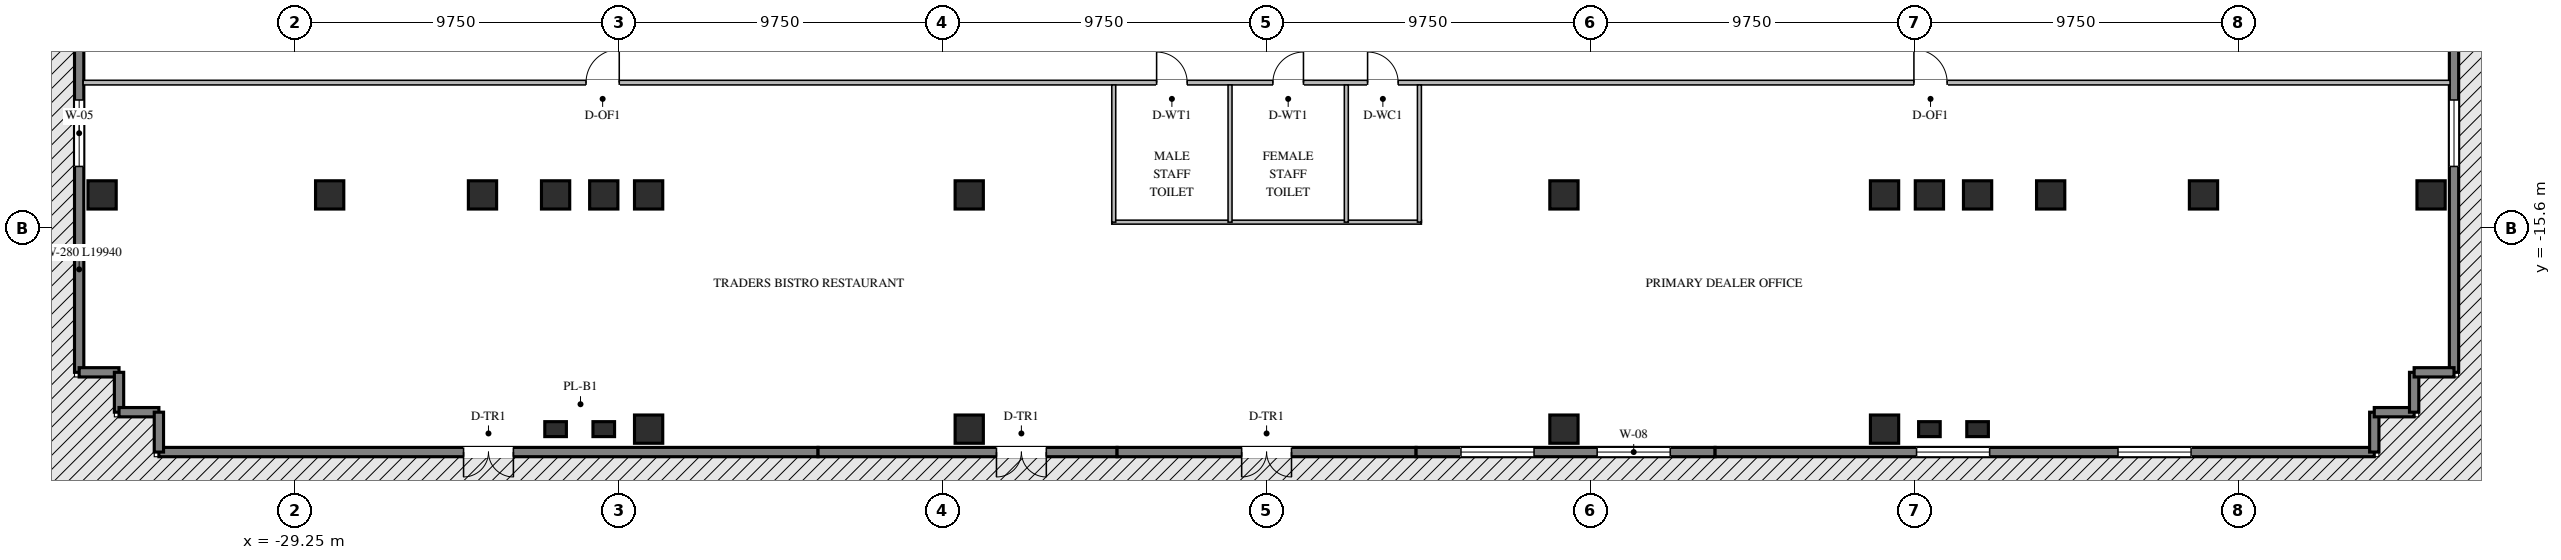
"""IFC4 building model, lengths in metres.
Left out: names, types, materials, properties, quantities, classifications, styles, units other than length and angle.
Written with IfcOpenShell. Run it as: python <this file> out.ifc"""

import sys

from ifc_helpers import new_model, si_unit, direction, frame, frame_2d, origin, origin_2d, place, context, subcontext, project, spatial, rectangle, i_section, extrude, element, fill, save


model = new_model("IFC4")
c1 = context("Model", 3, precision=1e-05, world=origin(), true_north=direction((0.0, 1.0)))
c2 = subcontext(c1, "Body", "Model", "MODEL_VIEW")
j1 = project(units=[si_unit("LENGTHUNIT", "METRE"), si_unit("PLANEANGLEUNIT", "RADIAN")], contexts=[c1])
p1 = place(None, origin())
s1 = spatial("IfcSite", under=j1, at=p1, CompositionType="ELEMENT")
p2 = place(p1, origin())
s2 = spatial("IfcBuilding", under=s1, at=p2, CompositionType="ELEMENT")
p3 = place(p2, frame((0.0, 0.0, 27.0)))
s3 = spatial("IfcBuildingStorey", under=s2, at=p3, CompositionType="ELEMENT", Elevation=27.0)
for number, where, z_axis, x_axis in (
    (1, (-21.4, -14.6, 0.0), (0.0, 0.0, 1.0), (1.0, 0.0, 0.0)),
    (2, (-19.95, -14.6, 0.0), (0.0, 0.0, 1.0), (1.0, 0.0, 0.0)),
    (3, (-18.6, -14.6, 0.0), (0.0, 0.0, 1.0), (1.0, 0.0, 0.0)),
    (4, (-8.95, -14.6, 0.0), (0.0, 0.0, 1.0), (1.0, 0.0, 0.0)),
    (5, (8.95, -14.6, 0.0), (0.0, 0.0, 1.0), (1.0, 0.0, 0.0)),
    (6, (18.6, -14.6, 0.0), (0.0, 0.0, 1.0), (1.0, 0.0, 0.0)),
    (7, (19.95, -14.6, 0.0), (0.0, 0.0, 1.0), (1.0, 0.0, 0.0)),
    (8, (21.4, -14.6, 0.0), (0.0, 0.0, 1.0), (1.0, 0.0, 0.0)),
    (9, (-23.6, -14.6, 0.0), (0.0, 0.0, 1.0), (1.0, 0.0, 0.0)),
    (10, (23.6, -14.6, 0.0), (0.0, 0.0, 1.0), (1.0, 0.0, 0.0)),
    (11, (-28.2, -14.6, 0.0), (0.0, 0.0, 1.0), (1.0, 0.0, 0.0)),
    (12, (28.2, -14.6, 0.0), (0.0, 0.0, 1.0), (1.0, 0.0, 0.0)),
    (13, (-18.6, -21.65, 0.0), (0.0, 0.0, 1.0), (1.0, 0.0, 0.0)),
    (14, (-8.95, -21.65, 0.0), (0.0, 0.0, 1.0), (1.0, 0.0, 0.0)),
    (15, (8.95, -21.65, 0.0), (0.0, 0.0, 1.0), (1.0, 0.0, 0.0)),
    (16, (18.6, -21.65, 0.0), (0.0, 0.0, 1.0), (1.0, 0.0, 0.0)),
    (17, (-35.05, -14.6, 0.0), (0.0, 0.0, 1.0), (1.0, 0.0, 0.0)),
    (18, (35.05, -14.6, 0.0), (0.0, 0.0, 1.0), (1.0, 0.0, 0.0)),
):
    element("IfcColumn", number, at=place(p3, frame(where, z_axis=z_axis, x_axis=x_axis)), inside=s3, PredefinedType="COLUMN", context=c2, shape_type="SweptSolid", body=[
        extrude(i_section(OverallWidth=0.85, OverallDepth=0.85, WebThickness=0.032, FlangeThickness=0.048, at=origin_2d()), origin(), (0.0, 0.0, 1.0), 4.2),
    ])
for number, where, z_axis, x_axis in (
    (19, (-21.4, -21.65, -0.28), (0.0, 0.0, 1.0), (1.0, 0.0, 0.0)),
    (20, (-19.95, -21.65, -0.28), (0.0, 0.0, 1.0), (1.0, 0.0, 0.0)),
    (21, (19.95, -21.65, -0.28), (0.0, 0.0, 1.0), (1.0, 0.0, 0.0)),
    (22, (21.4, -21.65, -0.28), (0.0, 0.0, 1.0), (1.0, 0.0, 0.0)),
):
    element("IfcColumn", number, at=place(p3, frame(where, z_axis=z_axis, x_axis=x_axis)), inside=s3, PredefinedType="PILASTER", context=c2, shape_type="SweptSolid", body=[
        extrude(rectangle(XDim=0.65, YDim=0.45, at=origin_2d()), origin(), (0.0, 0.0, 1.0), 4.48),
    ])
p4 = place(p3, frame((-13.5, -22.34, 0.0), z_axis=(0.0, 0.0, 1.0), x_axis=(-1.0, 0.0, 0.0)))
e23 = element("IfcWall", 23, at=p4, inside=s3, PredefinedType="STANDARD", context=c2, shape_type="SweptSolid", body=[
    extrude(rectangle(XDim=19.84, YDim=0.28, at=frame_2d((9.92, 0.0))), origin(), (0.0, 0.0, 1.0), 4.0),
])
p5 = place(p4, frame((9.17, 0.0, 0.0)))
e24 = element("IfcOpeningElement", 24, at=p5, cuts=e23, PredefinedType="OPENING", context=c2, shape_type="SweptSolid", body=[
    extrude(rectangle(XDim=1.5, YDim=2.15, at=frame_2d((0.75, 1.075))), frame((0.0, 0.15, 0.0), z_axis=(0.0, -1.0, 0.0), x_axis=(1.0, 0.0, 0.0)), (0.0, 0.0, 1.0), 0.3),
])
p6 = place(p3, frame((-4.5, -22.34, 0.0), z_axis=(0.0, 0.0, 1.0), x_axis=(-1.0, 0.0, 0.0)))
e25 = element("IfcWall", 25, at=p6, inside=s3, PredefinedType="STANDARD", context=c2, shape_type="SweptSolid", body=[
    extrude(rectangle(XDim=9.0, YDim=0.28, at=frame_2d((4.5, 0.0))), origin(), (0.0, 0.0, 1.0), 4.0),
])
p7 = place(p6, frame((2.13, 0.0, 0.0)))
e26 = element("IfcOpeningElement", 26, at=p7, cuts=e25, PredefinedType="OPENING", context=c2, shape_type="SweptSolid", body=[
    extrude(rectangle(XDim=1.5, YDim=2.15, at=frame_2d((0.75, 1.075))), frame((0.0, 0.15, 0.0), z_axis=(0.0, -1.0, 0.0), x_axis=(1.0, 0.0, 0.0)), (0.0, 0.0, 1.0), 0.3),
])
p8 = place(p3, frame((4.5, -22.34, 0.0), z_axis=(0.0, 0.0, 1.0), x_axis=(-1.0, 0.0, 0.0)))
e27 = element("IfcWall", 27, at=p8, inside=s3, PredefinedType="STANDARD", context=c2, shape_type="SweptSolid", body=[
    extrude(rectangle(XDim=9.0, YDim=0.28, at=frame_2d((4.5, 0.0))), origin(), (0.0, 0.0, 1.0), 4.0),
])
p9 = place(p8, frame((3.75, 0.0, 0.0)))
e28 = element("IfcOpeningElement", 28, at=p9, cuts=e27, PredefinedType="OPENING", context=c2, shape_type="SweptSolid", body=[
    extrude(rectangle(XDim=1.5, YDim=2.15, at=frame_2d((0.75, 1.075))), frame((0.0, 0.15, 0.0), z_axis=(0.0, -1.0, 0.0), x_axis=(1.0, 0.0, 0.0)), (0.0, 0.0, 1.0), 0.3),
])
p10 = place(p3, frame((13.5, -22.34, 0.0), z_axis=(0.0, 0.0, 1.0), x_axis=(-1.0, 0.0, 0.0)))
e29 = element("IfcWall", 29, at=p10, inside=s3, PredefinedType="STANDARD", context=c2, shape_type="SweptSolid", body=[
    extrude(rectangle(XDim=9.0, YDim=0.28, at=frame_2d((4.5, 0.0))), origin(), (0.0, 0.0, 1.0), 4.0),
])
p11 = place(p10, frame((1.35, 0.0, 0.76)))
e30 = element("IfcOpeningElement", 30, at=p11, cuts=e29, PredefinedType="OPENING", context=c2, shape_type="SweptSolid", body=[
    extrude(rectangle(XDim=2.2, YDim=2.25, at=frame_2d((1.1, 1.125))), frame((0.0, 0.15, 0.0), z_axis=(0.0, -1.0, 0.0), x_axis=(1.0, 0.0, 0.0)), (0.0, 0.0, 1.0), 0.3),
])
p12 = place(p10, frame((5.45, 0.0, 0.76)))
e31 = element("IfcOpeningElement", 31, at=p12, cuts=e29, PredefinedType="OPENING", context=c2, shape_type="SweptSolid", body=[
    extrude(rectangle(XDim=2.2, YDim=2.25, at=frame_2d((1.1, 1.125))), frame((0.0, 0.15, 0.0), z_axis=(0.0, -1.0, 0.0), x_axis=(1.0, 0.0, 0.0)), (0.0, 0.0, 1.0), 0.3),
])
p13 = place(p3, frame((33.34, -22.34, 0.0), z_axis=(0.0, 0.0, 1.0), x_axis=(-1.0, 0.0, 0.0)))
e32 = element("IfcWall", 32, at=p13, inside=s3, PredefinedType="STANDARD", context=c2, shape_type="SweptSolid", body=[
    extrude(rectangle(XDim=19.84, YDim=0.28, at=frame_2d((9.92, 0.0))), origin(), (0.0, 0.0, 1.0), 4.0),
])
p14 = place(p13, frame((5.513, 0.0, 0.76)))
e33 = element("IfcOpeningElement", 33, at=p14, cuts=e32, PredefinedType="OPENING", context=c2, shape_type="SweptSolid", body=[
    extrude(rectangle(XDim=2.2, YDim=2.25, at=frame_2d((1.1, 1.125))), frame((0.0, 0.15, 0.0), z_axis=(0.0, -1.0, 0.0), x_axis=(1.0, 0.0, 0.0)), (0.0, 0.0, 1.0), 0.3),
])
p15 = place(p13, frame((11.577, 0.0, 0.76)))
e34 = element("IfcOpeningElement", 34, at=p15, cuts=e32, PredefinedType="OPENING", context=c2, shape_type="SweptSolid", body=[
    extrude(rectangle(XDim=2.2, YDim=2.25, at=frame_2d((1.1, 1.125))), frame((0.0, 0.15, 0.0), z_axis=(0.0, -1.0, 0.0), x_axis=(1.0, 0.0, 0.0)), (0.0, 0.0, 1.0), 0.3),
])
p16 = place(p3, frame((-35.74, -19.94, 0.0), z_axis=(0.0, 0.0, 1.0), x_axis=(0.0, 1.0, 0.0)))
e35 = element("IfcWall", 35, at=p16, inside=s3, PredefinedType="STANDARD", context=c2, shape_type="SweptSolid", body=[
    extrude(rectangle(XDim=19.94, YDim=0.28, at=frame_2d((9.97, 0.0))), origin(), (0.0, 0.0, 1.0), 4.0),
])
p17 = place(p16, frame((6.197, 0.0, 0.76)))
e36 = element("IfcOpeningElement", 36, at=p17, cuts=e35, PredefinedType="OPENING", context=c2, shape_type="SweptSolid", body=[
    extrude(rectangle(XDim=2.0, YDim=2.05, at=frame_2d((1.0, 1.025))), frame((0.0, 0.15, 0.0), z_axis=(0.0, -1.0, 0.0), x_axis=(1.0, 0.0, 0.0)), (0.0, 0.0, 1.0), 0.3),
])
p18 = place(p16, frame((12.293, 0.0, 0.76)))
e37 = element("IfcOpeningElement", 37, at=p18, cuts=e35, PredefinedType="OPENING", context=c2, shape_type="SweptSolid", body=[
    extrude(rectangle(XDim=2.0, YDim=2.05, at=frame_2d((1.0, 1.025))), frame((0.0, 0.15, 0.0), z_axis=(0.0, -1.0, 0.0), x_axis=(1.0, 0.0, 0.0)), (0.0, 0.0, 1.0), 0.3),
])
p19 = place(p3, frame((35.74, 0.0, 0.0), z_axis=(0.0, 0.0, 1.0), x_axis=(0.0, -1.0, 0.0)))
e38 = element("IfcWall", 38, at=p19, inside=s3, PredefinedType="STANDARD", context=c2, shape_type="SweptSolid", body=[
    extrude(rectangle(XDim=19.94, YDim=0.28, at=frame_2d((9.97, 0.0))), origin(), (0.0, 0.0, 1.0), 4.0),
])
p20 = place(p19, frame((5.647, 0.0, 0.76)))
e39 = element("IfcOpeningElement", 39, at=p20, cuts=e38, PredefinedType="OPENING", context=c2, shape_type="SweptSolid", body=[
    extrude(rectangle(XDim=2.0, YDim=2.05, at=frame_2d((1.0, 1.025))), frame((0.0, 0.15, 0.0), z_axis=(0.0, -1.0, 0.0), x_axis=(1.0, 0.0, 0.0)), (0.0, 0.0, 1.0), 0.3),
])
p21 = place(p19, frame((11.743, 0.0, 0.76)))
e40 = element("IfcOpeningElement", 40, at=p21, cuts=e38, PredefinedType="OPENING", context=c2, shape_type="SweptSolid", body=[
    extrude(rectangle(XDim=2.0, YDim=2.05, at=frame_2d((1.0, 1.025))), frame((0.0, 0.15, 0.0), z_axis=(0.0, -1.0, 0.0), x_axis=(1.0, 0.0, 0.0)), (0.0, 0.0, 1.0), 0.3),
])
p22 = place(p3, frame((33.34, -22.34, 0.0), z_axis=(0.0, 0.0, 1.0), x_axis=(0.0, 1.0, 0.0)))
e41 = element("IfcWall", 41, at=p22, inside=s3, PredefinedType="STANDARD", context=c2, shape_type="SweptSolid", body=[
    extrude(rectangle(XDim=1.2, YDim=0.28, at=frame_2d((0.6, 0.0))), origin(), (0.0, 0.0, 1.0), 4.0),
])
for number, where, z_axis, x_axis in (
    (42, (33.34, -21.14, 0.0), (0.0, 0.0, 1.0), (1.0, 0.0, 0.0)),
    (43, (34.54, -21.14, 0.0), (0.0, 0.0, 1.0), (0.0, 1.0, 0.0)),
    (44, (34.54, -19.94, 0.0), (0.0, 0.0, 1.0), (1.0, 0.0, 0.0)),
    (45, (-35.74, -19.94, 0.0), (0.0, 0.0, 1.0), (1.0, 0.0, 0.0)),
    (46, (-34.54, -19.94, 0.0), (0.0, 0.0, 1.0), (0.0, -1.0, 0.0)),
    (47, (-34.54, -21.14, 0.0), (0.0, 0.0, 1.0), (1.0, 0.0, 0.0)),
):
    element("IfcWall", number, at=place(p3, frame(where, z_axis=z_axis, x_axis=x_axis)), inside=s3, PredefinedType="STANDARD", context=c2, shape_type="SweptSolid", body=[
        extrude(rectangle(XDim=1.2, YDim=0.28, at=frame_2d((0.6, 0.0))), origin(), (0.0, 0.0, 1.0), 4.0),
    ])
p23 = place(p3, frame((-33.34, -21.14, 0.0), z_axis=(0.0, 0.0, 1.0), x_axis=(0.0, -1.0, 0.0)))
e48 = element("IfcWall", 48, at=p23, inside=s3, PredefinedType="STANDARD", context=c2, shape_type="SweptSolid", body=[
    extrude(rectangle(XDim=1.2, YDim=0.28, at=frame_2d((0.6, 0.0))), origin(), (0.0, 0.0, 1.0), 4.0),
])
p24 = place(p3, frame((-35.62, -11.22, 0.0), z_axis=(0.0, 0.0, 1.0), x_axis=(1.0, 0.0, 0.0)))
e49 = element("IfcWall", 49, at=p24, inside=s3, PredefinedType="STANDARD", context=c2, shape_type="SweptSolid", body=[
    extrude(rectangle(XDim=71.24, YDim=0.14, at=frame_2d((35.62, 0.0))), origin(), (0.0, 0.0, 1.0), 3.495),
])
p25 = place(p24, frame((32.31, 0.0, 0.0)))
e50 = element("IfcOpeningElement", 50, at=p25, cuts=e49, PredefinedType="OPENING", context=c2, shape_type="SweptSolid", body=[
    extrude(rectangle(XDim=0.92, YDim=2.08, at=frame_2d((0.46, 1.04))), frame((0.0, 0.08, 0.0), z_axis=(0.0, -1.0, 0.0), x_axis=(1.0, 0.0, 0.0)), (0.0, 0.0, 1.0), 0.16),
])
p26 = place(p24, frame((35.81, 0.0, 0.0)))
e51 = element("IfcOpeningElement", 51, at=p26, cuts=e49, PredefinedType="OPENING", context=c2, shape_type="SweptSolid", body=[
    extrude(rectangle(XDim=0.92, YDim=2.08, at=frame_2d((0.46, 1.04))), frame((0.0, 0.08, 0.0), z_axis=(0.0, -1.0, 0.0), x_axis=(1.0, 0.0, 0.0)), (0.0, 0.0, 1.0), 0.16),
])
p27 = place(p24, frame((38.66, 0.0, 0.0)))
e52 = element("IfcOpeningElement", 52, at=p27, cuts=e49, PredefinedType="OPENING", context=c2, shape_type="SweptSolid", body=[
    extrude(rectangle(XDim=0.92, YDim=2.08, at=frame_2d((0.46, 1.04))), frame((0.0, 0.08, 0.0), z_axis=(0.0, -1.0, 0.0), x_axis=(1.0, 0.0, 0.0)), (0.0, 0.0, 1.0), 0.16),
])
p28 = place(p24, frame((15.136, 0.0, 0.0)))
e53 = element("IfcOpeningElement", 53, at=p28, cuts=e49, PredefinedType="OPENING", context=c2, shape_type="SweptSolid", body=[
    extrude(rectangle(XDim=1.0, YDim=2.08, at=frame_2d((0.5, 1.04))), frame((0.0, 0.08, 0.0), z_axis=(0.0, -1.0, 0.0), x_axis=(1.0, 0.0, 0.0)), (0.0, 0.0, 1.0), 0.16),
])
p29 = place(p24, frame((55.104, 0.0, 0.0)))
e54 = element("IfcOpeningElement", 54, at=p29, cuts=e49, PredefinedType="OPENING", context=c2, shape_type="SweptSolid", body=[
    extrude(rectangle(XDim=1.0, YDim=2.08, at=frame_2d((0.5, 1.04))), frame((0.0, 0.08, 0.0), z_axis=(0.0, -1.0, 0.0), x_axis=(1.0, 0.0, 0.0)), (0.0, 0.0, 1.0), 0.16),
])
p30 = place(p3, frame((-4.66, -15.42, 0.0), z_axis=(0.0, 0.0, 1.0), x_axis=(1.0, 0.0, 0.0)))
e55 = element("IfcWall", 55, at=p30, inside=s3, PredefinedType="STANDARD", context=c2, shape_type="SweptSolid", body=[
    extrude(rectangle(XDim=9.32, YDim=0.12, at=frame_2d((4.66, 0.0))), origin(), (0.0, 0.0, 1.0), 4.0),
])
for number, where, z_axis, x_axis in (
    (56, (-4.6, -15.42, 0.0), (0.0, 0.0, 1.0), (0.0, 1.0, 0.0)),
    (57, (-1.1, -15.42, 0.0), (0.0, 0.0, 1.0), (0.0, 1.0, 0.0)),
    (58, (2.4, -15.42, 0.0), (0.0, 0.0, 1.0), (0.0, 1.0, 0.0)),
    (59, (4.6, -15.42, 0.0), (0.0, 0.0, 1.0), (0.0, 1.0, 0.0)),
):
    element("IfcWall", number, at=place(p3, frame(where, z_axis=z_axis, x_axis=x_axis)), inside=s3, PredefinedType="STANDARD", context=c2, shape_type="SweptSolid", body=[
        extrude(rectangle(XDim=4.13, YDim=0.12, at=frame_2d((2.065, 0.0))), origin(), (0.0, 0.0, 1.0), 4.0),
    ])
p31 = place(p5, origin())
e60 = element("IfcDoor", 60, at=p31, inside=s3, OperationType="DOUBLE_DOOR_SINGLE_SWING", PredefinedType="DOOR", context=c2, shape_type="SweptSolid", body=[
    extrude(rectangle(XDim=1.5, YDim=2.15, at=frame_2d((0.75, 1.075))), frame((0.0, 0.025, 0.0), z_axis=(0.0, -1.0, 0.0), x_axis=(1.0, 0.0, 0.0)), (0.0, 0.0, 1.0), 0.05),
])
fill(e24, e60)
p32 = place(p7, origin())
e61 = element("IfcDoor", 61, at=p32, inside=s3, OperationType="DOUBLE_DOOR_SINGLE_SWING", PredefinedType="DOOR", context=c2, shape_type="SweptSolid", body=[
    extrude(rectangle(XDim=1.5, YDim=2.15, at=frame_2d((0.75, 1.075))), frame((0.0, 0.025, 0.0), z_axis=(0.0, -1.0, 0.0), x_axis=(1.0, 0.0, 0.0)), (0.0, 0.0, 1.0), 0.05),
])
fill(e26, e61)
p33 = place(p9, origin())
e62 = element("IfcDoor", 62, at=p33, inside=s3, OperationType="DOUBLE_DOOR_SINGLE_SWING", PredefinedType="DOOR", context=c2, shape_type="SweptSolid", body=[
    extrude(rectangle(XDim=1.5, YDim=2.15, at=frame_2d((0.75, 1.075))), frame((0.0, 0.025, 0.0), z_axis=(0.0, -1.0, 0.0), x_axis=(1.0, 0.0, 0.0)), (0.0, 0.0, 1.0), 0.05),
])
fill(e28, e62)
p34 = place(p11, origin())
e63 = element("IfcWindow", 63, at=p34, inside=s3, PartitioningType="DOUBLE_PANEL_VERTICAL", PredefinedType="WINDOW", context=c2, shape_type="SweptSolid", body=[
    extrude(rectangle(XDim=2.2, YDim=2.25, at=frame_2d((1.1, 1.125))), frame((0.0, 0.03, 0.0), z_axis=(0.0, -1.0, 0.0), x_axis=(1.0, 0.0, 0.0)), (0.0, 0.0, 1.0), 0.06),
])
fill(e30, e63)
p35 = place(p12, origin())
e64 = element("IfcWindow", 64, at=p35, inside=s3, PartitioningType="DOUBLE_PANEL_VERTICAL", PredefinedType="WINDOW", context=c2, shape_type="SweptSolid", body=[
    extrude(rectangle(XDim=2.2, YDim=2.25, at=frame_2d((1.1, 1.125))), frame((0.0, 0.03, 0.0), z_axis=(0.0, -1.0, 0.0), x_axis=(1.0, 0.0, 0.0)), (0.0, 0.0, 1.0), 0.06),
])
fill(e31, e64)
p36 = place(p14, origin())
e65 = element("IfcWindow", 65, at=p36, inside=s3, PartitioningType="DOUBLE_PANEL_VERTICAL", PredefinedType="WINDOW", context=c2, shape_type="SweptSolid", body=[
    extrude(rectangle(XDim=2.2, YDim=2.25, at=frame_2d((1.1, 1.125))), frame((0.0, 0.03, 0.0), z_axis=(0.0, -1.0, 0.0), x_axis=(1.0, 0.0, 0.0)), (0.0, 0.0, 1.0), 0.06),
])
fill(e33, e65)
p37 = place(p15, origin())
e66 = element("IfcWindow", 66, at=p37, inside=s3, PartitioningType="DOUBLE_PANEL_VERTICAL", PredefinedType="WINDOW", context=c2, shape_type="SweptSolid", body=[
    extrude(rectangle(XDim=2.2, YDim=2.25, at=frame_2d((1.1, 1.125))), frame((0.0, 0.03, 0.0), z_axis=(0.0, -1.0, 0.0), x_axis=(1.0, 0.0, 0.0)), (0.0, 0.0, 1.0), 0.06),
])
fill(e34, e66)
p38 = place(p17, origin())
e67 = element("IfcWindow", 67, at=p38, inside=s3, PartitioningType="DOUBLE_PANEL_VERTICAL", PredefinedType="WINDOW", context=c2, shape_type="SweptSolid", body=[
    extrude(rectangle(XDim=2.0, YDim=2.05, at=frame_2d((1.0, 1.025))), frame((0.0, 0.03, 0.0), z_axis=(0.0, -1.0, 0.0), x_axis=(1.0, 0.0, 0.0)), (0.0, 0.0, 1.0), 0.06),
])
fill(e36, e67)
p39 = place(p21, origin())
e68 = element("IfcWindow", 68, at=p39, inside=s3, PartitioningType="DOUBLE_PANEL_VERTICAL", PredefinedType="WINDOW", context=c2, shape_type="SweptSolid", body=[
    extrude(rectangle(XDim=2.0, YDim=2.05, at=frame_2d((1.0, 1.025))), frame((0.0, 0.03, 0.0), z_axis=(0.0, -1.0, 0.0), x_axis=(1.0, 0.0, 0.0)), (0.0, 0.0, 1.0), 0.06),
])
fill(e40, e68)
p40 = place(p25, origin())
e69 = element("IfcDoor", 69, at=p40, inside=s3, OperationType="SINGLE_SWING_LEFT", PredefinedType="DOOR", context=c2, shape_type="SweptSolid", body=[
    extrude(rectangle(XDim=0.92, YDim=2.08, at=frame_2d((0.46, 1.04))), frame((0.0, 0.025, 0.0), z_axis=(0.0, -1.0, 0.0), x_axis=(1.0, 0.0, 0.0)), (0.0, 0.0, 1.0), 0.05),
])
fill(e50, e69)
p41 = place(p26, origin())
e70 = element("IfcDoor", 70, at=p41, inside=s3, OperationType="SINGLE_SWING_RIGHT", PredefinedType="DOOR", context=c2, shape_type="SweptSolid", body=[
    extrude(rectangle(XDim=0.92, YDim=2.08, at=frame_2d((0.46, 1.04))), frame((0.0, 0.025, 0.0), z_axis=(0.0, -1.0, 0.0), x_axis=(1.0, 0.0, 0.0)), (0.0, 0.0, 1.0), 0.05),
])
fill(e51, e70)
p42 = place(p27, origin())
e71 = element("IfcDoor", 71, at=p42, inside=s3, OperationType="SINGLE_SWING_LEFT", PredefinedType="DOOR", context=c2, shape_type="SweptSolid", body=[
    extrude(rectangle(XDim=0.92, YDim=2.08, at=frame_2d((0.46, 1.04))), frame((0.0, 0.025, 0.0), z_axis=(0.0, -1.0, 0.0), x_axis=(1.0, 0.0, 0.0)), (0.0, 0.0, 1.0), 0.05),
])
fill(e52, e71)
p43 = place(p28, origin())
e72 = element("IfcDoor", 72, at=p43, inside=s3, OperationType="SINGLE_SWING_RIGHT", PredefinedType="DOOR", context=c2, shape_type="SweptSolid", body=[
    extrude(rectangle(XDim=1.0, YDim=2.08, at=frame_2d((0.5, 1.04))), frame((0.0, 0.025, 0.0), z_axis=(0.0, -1.0, 0.0), x_axis=(1.0, 0.0, 0.0)), (0.0, 0.0, 1.0), 0.05),
])
fill(e53, e72)
p44 = place(p29, origin())
e73 = element("IfcDoor", 73, at=p44, inside=s3, OperationType="SINGLE_SWING_LEFT", PredefinedType="DOOR", context=c2, shape_type="SweptSolid", body=[
    extrude(rectangle(XDim=1.0, YDim=2.08, at=frame_2d((0.5, 1.04))), frame((0.0, 0.025, 0.0), z_axis=(0.0, -1.0, 0.0), x_axis=(1.0, 0.0, 0.0)), (0.0, 0.0, 1.0), 0.05),
])
fill(e54, e73)
save(model, sys.argv[1])
